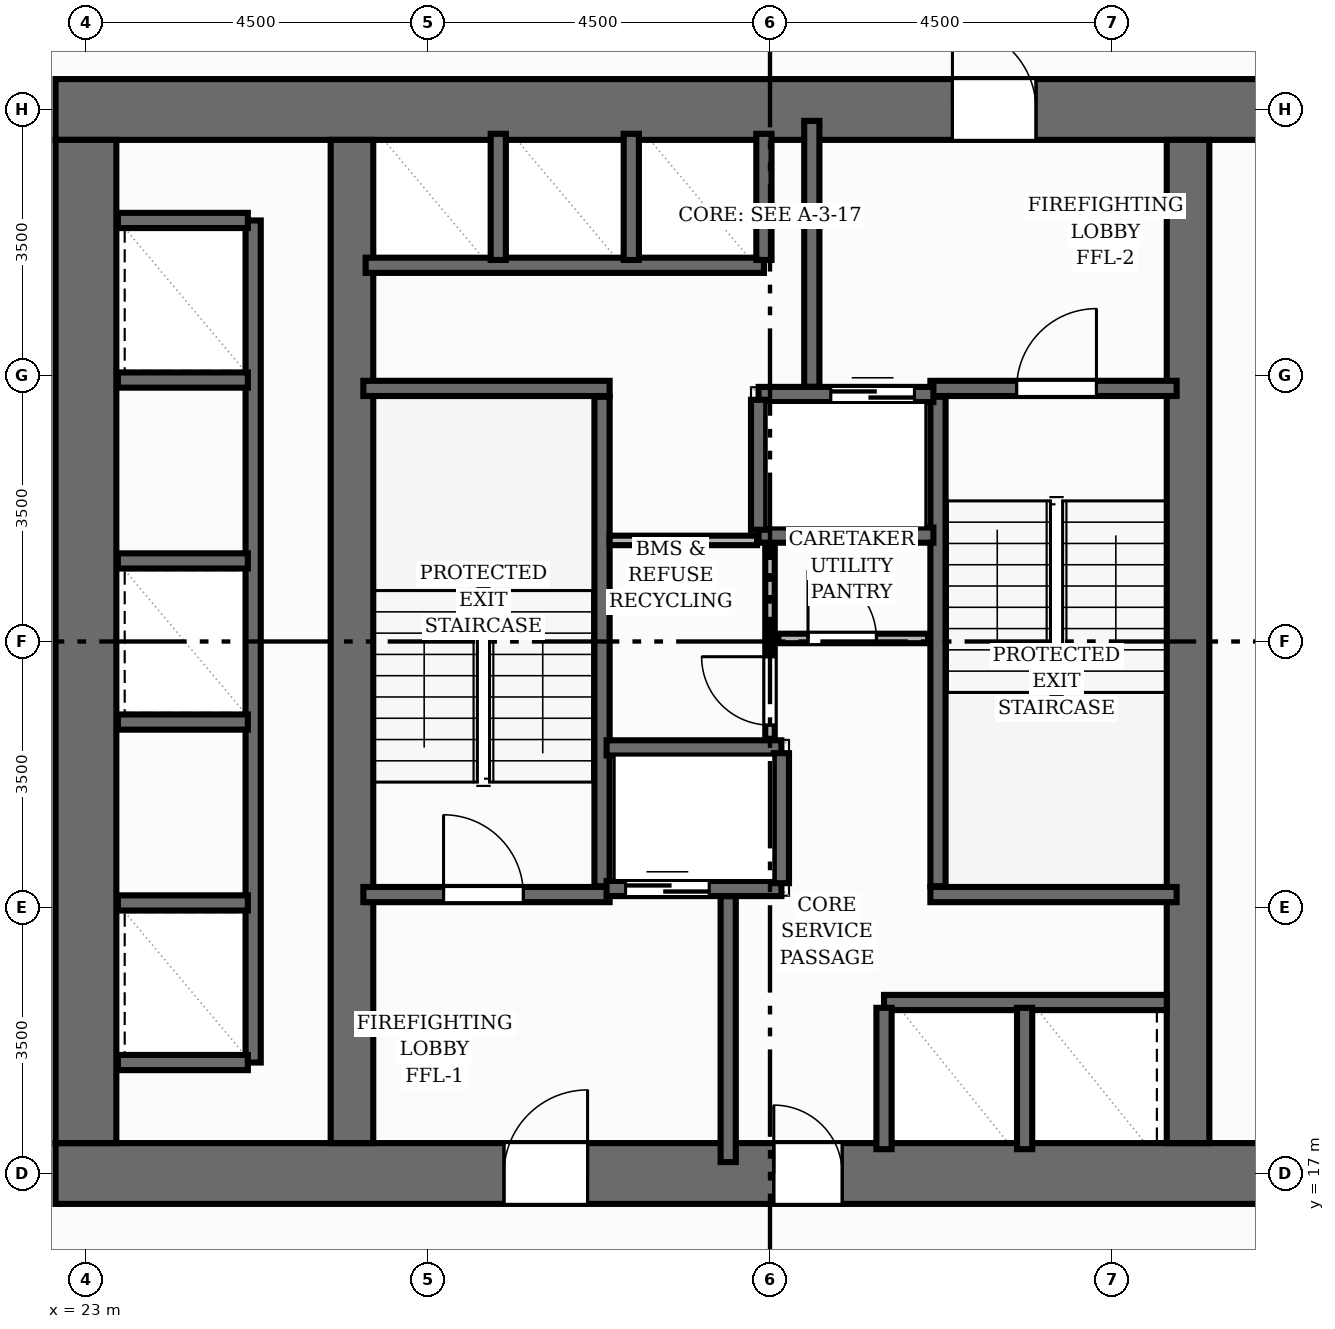
"""IFC4 building model, lengths in metres.
Left out: names, types, materials, properties, quantities, classifications, styles, units other than length and angle.
Written with IfcOpenShell. Run it as: python <this file> out.ifc"""

import sys

from ifc_helpers import new_model, si_unit, direction, frame, frame_2d, origin, place, context, subcontext, project, spatial, rectangle, extrude, element, fill, save


model = new_model("IFC4")
c1 = context("Model", 3, precision=1e-05, world=origin(), true_north=direction((0.0, 1.0)))
c2 = subcontext(c1, "Body", "Model", "MODEL_VIEW")
j1 = project(units=[si_unit("LENGTHUNIT", "METRE"), si_unit("PLANEANGLEUNIT", "RADIAN")], contexts=[c1])
p1 = place(None, origin())
s1 = spatial("IfcSite", under=j1, at=p1, CompositionType="ELEMENT")
p2 = place(p1, origin())
s2 = spatial("IfcBuilding", under=s1, at=p2, CompositionType="ELEMENT")
p3 = place(p2, frame((0.0, 0.0, 63.2)))
s3 = spatial("IfcBuildingStorey", under=s2, at=p3, CompositionType="ELEMENT", Elevation=63.2)
p4 = place(p3, frame((22.6, 17.0, 0.0), z_axis=(0.0, 0.0, 1.0), x_axis=(1.0, 0.0, 0.0)))
e1 = element("IfcWall", 1, at=p4, inside=s3, PredefinedType="SHEAR", context=c2, shape_type="SweptSolid", body=[
    extrude(rectangle(XDim=18.8, YDim=0.8, at=frame_2d((9.4, 0.0))), origin(), (0.0, 0.0, 1.0), 3.2),
])
p5 = place(p4, frame((5.9, 0.0, 0.0)))
e2 = element("IfcOpeningElement", 2, at=p5, cuts=e1, PredefinedType="OPENING", context=c2, shape_type="SweptSolid", body=[
    extrude(rectangle(XDim=1.1, YDim=2.15, at=frame_2d((0.55, 1.075))), frame((0.0, 0.41, 0.0), z_axis=(0.0, -1.0, 0.0), x_axis=(1.0, 0.0, 0.0)), (0.0, 0.0, 1.0), 0.82),
])
p6 = place(p4, frame((9.45, 0.0, 0.0)))
e3 = element("IfcOpeningElement", 3, at=p6, cuts=e1, PredefinedType="OPENING", context=c2, shape_type="SweptSolid", body=[
    extrude(rectangle(XDim=0.9, YDim=2.0, at=frame_2d((0.45, 1.0))), frame((0.0, 0.41, 0.0), z_axis=(0.0, -1.0, 0.0), x_axis=(1.0, 0.0, 0.0)), (0.0, 0.0, 1.0), 0.82),
])
p7 = place(p3, frame((22.6, 31.0, 0.0), z_axis=(0.0, 0.0, 1.0), x_axis=(1.0, 0.0, 0.0)))
e4 = element("IfcWall", 4, at=p7, inside=s3, PredefinedType="SHEAR", context=c2, shape_type="SweptSolid", body=[
    extrude(rectangle(XDim=18.8, YDim=0.8, at=frame_2d((9.4, 0.0))), origin(), (0.0, 0.0, 1.0), 3.2),
])
p8 = place(p7, frame((11.8, 0.0, 0.0)))
e5 = element("IfcOpeningElement", 5, at=p8, cuts=e4, PredefinedType="OPENING", context=c2, shape_type="SweptSolid", body=[
    extrude(rectangle(XDim=1.1, YDim=2.15, at=frame_2d((0.55, 1.075))), frame((0.0, 0.41, 0.0), z_axis=(0.0, -1.0, 0.0), x_axis=(1.0, 0.0, 0.0)), (0.0, 0.0, 1.0), 0.82),
])
p9 = place(p3, frame((23.0, 17.4, 0.0), z_axis=(0.0, 0.0, 1.0), x_axis=(0.0, 1.0, 0.0)))
e6 = element("IfcWall", 6, at=p9, inside=s3, PredefinedType="SHEAR", context=c2, shape_type="SweptSolid", body=[
    extrude(rectangle(XDim=13.2, YDim=0.8, at=frame_2d((6.6, 0.0))), origin(), (0.0, 0.0, 1.0), 3.2),
])
for number, where, z_axis, x_axis in (
    (7, (26.5, 17.4, 0.0), (0.0, 0.0, 1.0), (0.0, 1.0, 0.0)),
    (8, (37.5, 17.4, 0.0), (0.0, 0.0, 1.0), (0.0, 1.0, 0.0)),
):
    element("IfcWall", number, at=place(p3, frame(where, z_axis=z_axis, x_axis=x_axis)), inside=s3, PredefinedType="SHEAR", context=c2, shape_type="SweptSolid", body=[
        extrude(rectangle(XDim=13.2, YDim=0.56, at=frame_2d((6.6, 0.0))), origin(), (0.0, 0.0, 1.0), 3.2),
    ])
p10 = place(p3, frame((29.79, 20.78, 0.0), z_axis=(0.0, 0.0, 1.0), x_axis=(0.0, 1.0, 0.0)))
e9 = element("IfcWall", 9, at=p10, inside=s3, PredefinedType="SHEAR", context=c2, shape_type="SweptSolid", body=[
    extrude(rectangle(XDim=6.44, YDim=0.2, at=frame_2d((3.22, 0.0))), origin(), (0.0, 0.0, 1.0), 3.2),
])
p11 = place(p3, frame((26.65, 27.33, 0.0), z_axis=(0.0, 0.0, 1.0), x_axis=(1.0, 0.0, 0.0)))
e10 = element("IfcWall", 10, at=p11, inside=s3, PredefinedType="SHEAR", context=c2, shape_type="SweptSolid", body=[
    extrude(rectangle(XDim=3.24, YDim=0.2, at=frame_2d((1.62, 0.0))), origin(), (0.0, 0.0, 1.0), 3.2),
])
p12 = place(p3, frame((26.65, 20.67, 0.0), z_axis=(0.0, 0.0, 1.0), x_axis=(1.0, 0.0, 0.0)))
e11 = element("IfcWall", 11, at=p12, inside=s3, PredefinedType="SHEAR", context=c2, shape_type="SweptSolid", body=[
    extrude(rectangle(XDim=3.24, YDim=0.2, at=frame_2d((1.62, 0.0))), origin(), (0.0, 0.0, 1.0), 3.2),
])
p13 = place(p12, frame((1.055, 0.0, 0.0)))
e12 = element("IfcOpeningElement", 12, at=p13, cuts=e11, PredefinedType="OPENING", context=c2, shape_type="SweptSolid", body=[
    extrude(rectangle(XDim=1.05, YDim=2.15, at=frame_2d((0.525, 1.075))), frame((0.0, 0.11, 0.0), z_axis=(0.0, -1.0, 0.0), x_axis=(1.0, 0.0, 0.0)), (0.0, 0.0, 1.0), 0.22),
])
p14 = place(p3, frame((34.21, 20.78, 0.0), z_axis=(0.0, 0.0, 1.0), x_axis=(0.0, 1.0, 0.0)))
e13 = element("IfcWall", 13, at=p14, inside=s3, PredefinedType="SHEAR", context=c2, shape_type="SweptSolid", body=[
    extrude(rectangle(XDim=6.44, YDim=0.2, at=frame_2d((3.22, 0.0))), origin(), (0.0, 0.0, 1.0), 3.2),
])
p15 = place(p3, frame((34.11, 20.67, 0.0), z_axis=(0.0, 0.0, 1.0), x_axis=(1.0, 0.0, 0.0)))
e14 = element("IfcWall", 14, at=p15, inside=s3, PredefinedType="SHEAR", context=c2, shape_type="SweptSolid", body=[
    extrude(rectangle(XDim=3.24, YDim=0.2, at=frame_2d((1.62, 0.0))), origin(), (0.0, 0.0, 1.0), 3.2),
])
p16 = place(p3, frame((34.11, 27.33, 0.0), z_axis=(0.0, 0.0, 1.0), x_axis=(1.0, 0.0, 0.0)))
e15 = element("IfcWall", 15, at=p16, inside=s3, PredefinedType="SHEAR", context=c2, shape_type="SweptSolid", body=[
    extrude(rectangle(XDim=3.24, YDim=0.2, at=frame_2d((1.62, 0.0))), origin(), (0.0, 0.0, 1.0), 3.2),
])
p17 = place(p16, frame((1.135, 0.0, 0.0)))
e16 = element("IfcOpeningElement", 16, at=p17, cuts=e15, PredefinedType="OPENING", context=c2, shape_type="SweptSolid", body=[
    extrude(rectangle(XDim=1.05, YDim=2.15, at=frame_2d((0.525, 1.075))), frame((0.0, 0.11, 0.0), z_axis=(0.0, -1.0, 0.0), x_axis=(1.0, 0.0, 0.0)), (0.0, 0.0, 1.0), 0.22),
])
for number, where, z_axis, x_axis in (
    (17, (31.45, 17.15, 0.0), (0.0, 0.0, 1.0), (0.0, 1.0, 0.0)),
    (18, (32.55, 27.35, 0.0), (0.0, 0.0, 1.0), (0.0, 1.0, 0.0)),
):
    element("IfcWall", number, at=place(p3, frame(where, z_axis=z_axis, x_axis=x_axis)), inside=s3, PredefinedType="SHEAR", context=c2, shape_type="SweptSolid", body=[
        extrude(rectangle(XDim=3.5, YDim=0.2, at=frame_2d((1.75, 0.0))), origin(), (0.0, 0.0, 1.0), 3.2),
    ])
p18 = place(p3, frame((29.85, 20.75, 0.0), z_axis=(0.0, 0.0, 1.0), x_axis=(1.0, 0.0, 0.0)))
e19 = element("IfcWall", 19, at=p18, inside=s3, PredefinedType="SHEAR", context=c2, shape_type="SweptSolid", body=[
    extrude(rectangle(XDim=2.3, YDim=0.2, at=frame_2d((1.15, 0.0))), origin(), (0.0, 0.0, 1.0), 3.2),
])
p19 = place(p18, frame((0.25, 0.0, 0.0)))
e20 = element("IfcOpeningElement", 20, at=p19, cuts=e19, PredefinedType="OPENING", context=c2, shape_type="SweptSolid", body=[
    extrude(rectangle(XDim=1.1, YDim=2.15, at=frame_2d((0.55, 1.075))), frame((0.0, 0.11, 0.0), z_axis=(0.0, -1.0, 0.0), x_axis=(1.0, 0.0, 0.0)), (0.0, 0.0, 1.0), 0.22),
])
p20 = place(p3, frame((29.85, 22.6, 0.0), z_axis=(0.0, 0.0, 1.0), x_axis=(1.0, 0.0, 0.0)))
e21 = element("IfcWall", 21, at=p20, inside=s3, PredefinedType="SHEAR", context=c2, shape_type="SweptSolid", body=[
    extrude(rectangle(XDim=2.3, YDim=0.2, at=frame_2d((1.15, 0.0))), origin(), (0.0, 0.0, 1.0), 3.2),
])
p21 = place(p3, frame((32.15, 20.82, 0.0), z_axis=(0.0, 0.0, 1.0), x_axis=(0.0, 1.0, 0.0)))
e22 = element("IfcWall", 22, at=p21, inside=s3, PredefinedType="SHEAR", context=c2, shape_type="SweptSolid", body=[
    extrude(rectangle(XDim=1.71, YDim=0.2, at=frame_2d((0.855, 0.0))), origin(), (0.0, 0.0, 1.0), 3.2),
])
p22 = place(p3, frame((31.85, 27.25, 0.0), z_axis=(0.0, 0.0, 1.0), x_axis=(1.0, 0.0, 0.0)))
e23 = element("IfcWall", 23, at=p22, inside=s3, PredefinedType="SHEAR", context=c2, shape_type="SweptSolid", body=[
    extrude(rectangle(XDim=2.3, YDim=0.2, at=frame_2d((1.15, 0.0))), origin(), (0.0, 0.0, 1.0), 3.2),
])
p23 = place(p22, frame((0.95, 0.0, 0.0)))
e24 = element("IfcOpeningElement", 24, at=p23, cuts=e23, PredefinedType="OPENING", context=c2, shape_type="SweptSolid", body=[
    extrude(rectangle(XDim=1.1, YDim=2.15, at=frame_2d((0.55, 1.075))), frame((0.0, 0.11, 0.0), z_axis=(0.0, -1.0, 0.0), x_axis=(1.0, 0.0, 0.0)), (0.0, 0.0, 1.0), 0.22),
])
p24 = place(p3, frame((31.85, 25.4, 0.0), z_axis=(0.0, 0.0, 1.0), x_axis=(1.0, 0.0, 0.0)))
e25 = element("IfcWall", 25, at=p24, inside=s3, PredefinedType="SHEAR", context=c2, shape_type="SweptSolid", body=[
    extrude(rectangle(XDim=2.3, YDim=0.2, at=frame_2d((1.15, 0.0))), origin(), (0.0, 0.0, 1.0), 3.2),
])
p25 = place(p3, frame((31.85, 25.47, 0.0), z_axis=(0.0, 0.0, 1.0), x_axis=(0.0, 1.0, 0.0)))
e26 = element("IfcWall", 26, at=p25, inside=s3, PredefinedType="SHEAR", context=c2, shape_type="SweptSolid", body=[
    extrude(rectangle(XDim=1.71, YDim=0.2, at=frame_2d((0.855, 0.0))), origin(), (0.0, 0.0, 1.0), 3.2),
])
p26 = place(p3, frame((25.2, 18.46, 0.0), z_axis=(0.0, 0.0, 1.0), x_axis=(0.0, 1.0, 0.0)))
e27 = element("IfcWall", 27, at=p26, inside=s3, PredefinedType="SHEAR", context=c2, shape_type="SweptSolid", body=[
    extrude(rectangle(XDim=11.08, YDim=0.2, at=frame_2d((5.54, 0.0))), origin(), (0.0, 0.0, 1.0), 3.2),
])
for number, where, z_axis, x_axis in (
    (28, (23.42, 18.46, 0.0), (0.0, 0.0, 1.0), (1.0, 0.0, 0.0)),
    (29, (23.42, 29.54, 0.0), (0.0, 0.0, 1.0), (1.0, 0.0, 0.0)),
    (30, (23.42, 20.56, 0.0), (0.0, 0.0, 1.0), (1.0, 0.0, 0.0)),
    (31, (23.42, 22.94, 0.0), (0.0, 0.0, 1.0), (1.0, 0.0, 0.0)),
    (32, (23.42, 25.06, 0.0), (0.0, 0.0, 1.0), (1.0, 0.0, 0.0)),
    (33, (23.42, 27.44, 0.0), (0.0, 0.0, 1.0), (1.0, 0.0, 0.0)),
):
    element("IfcWall", number, at=place(p3, frame(where, z_axis=z_axis, x_axis=x_axis)), inside=s3, PredefinedType="SHEAR", context=c2, shape_type="SweptSolid", body=[
        extrude(rectangle(XDim=1.71, YDim=0.2, at=frame_2d((0.855, 0.0))), origin(), (0.0, 0.0, 1.0), 3.2),
    ])
p27 = place(p3, frame((26.68, 28.95, 0.0), z_axis=(0.0, 0.0, 1.0), x_axis=(1.0, 0.0, 0.0)))
e34 = element("IfcWall", 34, at=p27, inside=s3, PredefinedType="SHEAR", context=c2, shape_type="SweptSolid", body=[
    extrude(rectangle(XDim=5.24, YDim=0.2, at=frame_2d((2.62, 0.0))), origin(), (0.0, 0.0, 1.0), 3.2),
])
for number, where, z_axis, x_axis in (
    (35, (31.92, 29.02, 0.0), (0.0, 0.0, 1.0), (0.0, 1.0, 0.0)),
    (36, (28.425, 29.02, 0.0), (0.0, 0.0, 1.0), (0.0, 1.0, 0.0)),
    (37, (30.175, 29.02, 0.0), (0.0, 0.0, 1.0), (0.0, 1.0, 0.0)),
):
    element("IfcWall", number, at=place(p3, frame(where, z_axis=z_axis, x_axis=x_axis)), inside=s3, PredefinedType="SHEAR", context=c2, shape_type="SweptSolid", body=[
        extrude(rectangle(XDim=1.66, YDim=0.2, at=frame_2d((0.83, 0.0))), origin(), (0.0, 0.0, 1.0), 3.2),
    ])
p28 = place(p3, frame((33.5, 19.25, 0.0), z_axis=(0.0, 0.0, 1.0), x_axis=(1.0, 0.0, 0.0)))
e38 = element("IfcWall", 38, at=p28, inside=s3, PredefinedType="SHEAR", context=c2, shape_type="SweptSolid", body=[
    extrude(rectangle(XDim=3.72, YDim=0.2, at=frame_2d((1.86, 0.0))), origin(), (0.0, 0.0, 1.0), 3.2),
])
for number, where, z_axis, x_axis in (
    (39, (33.5, 17.32, 0.0), (0.0, 0.0, 1.0), (0.0, 1.0, 0.0)),
    (40, (35.35, 17.32, 0.0), (0.0, 0.0, 1.0), (0.0, 1.0, 0.0)),
):
    element("IfcWall", number, at=place(p3, frame(where, z_axis=z_axis, x_axis=x_axis)), inside=s3, PredefinedType="SHEAR", context=c2, shape_type="SweptSolid", body=[
        extrude(rectangle(XDim=1.86, YDim=0.2, at=frame_2d((0.93, 0.0))), origin(), (0.0, 0.0, 1.0), 3.2),
    ])
p29 = place(p3, frame((32.0, 22.72, 0.0), z_axis=(0.0, 0.0, 1.0), x_axis=(0.0, 1.0, 0.0)))
e41 = element("IfcWall", 41, at=p29, inside=s3, PredefinedType="PARTITIONING", context=c2, shape_type="SweptSolid", body=[
    extrude(rectangle(XDim=2.52, YDim=0.125, at=frame_2d((1.26, 0.0))), origin(), (0.0, 0.0, 1.0), 2.795),
])
p30 = place(p29, frame((0.18, 0.0, 0.0)))
e42 = element("IfcOpeningElement", 42, at=p30, cuts=e41, PredefinedType="OPENING", context=c2, shape_type="SweptSolid", body=[
    extrude(rectangle(XDim=0.9, YDim=2.1, at=frame_2d((0.45, 1.05))), frame((0.0, 0.073, 0.0), z_axis=(0.0, -1.0, 0.0), x_axis=(1.0, 0.0, 0.0)), (0.0, 0.0, 1.0), 0.145),
])
p31 = place(p3, frame((32.11, 24.04, 0.0), z_axis=(0.0, 0.0, 1.0), x_axis=(1.0, 0.0, 0.0)))
e43 = element("IfcWall", 43, at=p31, inside=s3, PredefinedType="PARTITIONING", context=c2, shape_type="SweptSolid", body=[
    extrude(rectangle(XDim=1.97, YDim=0.125, at=frame_2d((0.985, 0.0))), origin(), (0.0, 0.0, 1.0), 2.795),
])
p32 = place(p31, frame((0.39, 0.0, 0.0)))
e44 = element("IfcOpeningElement", 44, at=p32, cuts=e43, PredefinedType="OPENING", context=c2, shape_type="SweptSolid", body=[
    extrude(rectangle(XDim=0.9, YDim=2.1, at=frame_2d((0.45, 1.05))), frame((0.0, 0.073, 0.0), z_axis=(0.0, -1.0, 0.0), x_axis=(1.0, 0.0, 0.0)), (0.0, 0.0, 1.0), 0.145),
])
p33 = place(p3, frame((29.89, 25.33, 0.0), z_axis=(0.0, 0.0, 1.0), x_axis=(1.0, 0.0, 0.0)))
e45 = element("IfcWall", 45, at=p33, inside=s3, PredefinedType="PARTITIONING", context=c2, shape_type="SweptSolid", body=[
    extrude(rectangle(XDim=1.94, YDim=0.125, at=frame_2d((0.97, 0.0))), origin(), (0.0, 0.0, 1.0), 2.795),
])
p34 = place(p13, origin())
e46 = element("IfcDoor", 46, at=p34, inside=s3, OperationType="SINGLE_SWING_LEFT", PredefinedType="DOOR", context=c2, shape_type="SweptSolid", body=[
    extrude(rectangle(XDim=1.05, YDim=2.15, at=frame_2d((0.525, 1.075))), frame((0.0, 0.025, 0.0), z_axis=(0.0, -1.0, 0.0), x_axis=(1.0, 0.0, 0.0)), (0.0, 0.0, 1.0), 0.05),
])
fill(e12, e46)
p35 = place(p17, origin())
e47 = element("IfcDoor", 47, at=p35, inside=s3, OperationType="SINGLE_SWING_RIGHT", PredefinedType="DOOR", context=c2, shape_type="SweptSolid", body=[
    extrude(rectangle(XDim=1.05, YDim=2.15, at=frame_2d((0.525, 1.075))), frame((0.0, 0.025, 0.0), z_axis=(0.0, -1.0, 0.0), x_axis=(1.0, 0.0, 0.0)), (0.0, 0.0, 1.0), 0.05),
])
fill(e16, e47)
p36 = place(p5, origin())
e48 = element("IfcDoor", 48, at=p36, inside=s3, OperationType="SINGLE_SWING_RIGHT", PredefinedType="DOOR", context=c2, shape_type="SweptSolid", body=[
    extrude(rectangle(XDim=1.1, YDim=2.15, at=frame_2d((0.55, 1.075))), frame((0.0, 0.025, 0.0), z_axis=(0.0, -1.0, 0.0), x_axis=(1.0, 0.0, 0.0)), (0.0, 0.0, 1.0), 0.05),
])
fill(e2, e48)
p37 = place(p8, origin())
e49 = element("IfcDoor", 49, at=p37, inside=s3, OperationType="SINGLE_SWING_LEFT", PredefinedType="DOOR", context=c2, shape_type="SweptSolid", body=[
    extrude(rectangle(XDim=1.1, YDim=2.15, at=frame_2d((0.55, 1.075))), frame((0.0, 0.025, 0.0), z_axis=(0.0, -1.0, 0.0), x_axis=(1.0, 0.0, 0.0)), (0.0, 0.0, 1.0), 0.05),
])
fill(e5, e49)
p38 = place(p19, origin())
e50 = element("IfcDoor", 50, at=p38, inside=s3, OperationType="DOUBLE_DOOR_SLIDING", PredefinedType="DOOR", context=c2, shape_type="SweptSolid", body=[
    extrude(rectangle(XDim=1.1, YDim=2.15, at=frame_2d((0.55, 1.075))), frame((0.0, 0.025, 0.0), z_axis=(0.0, -1.0, 0.0), x_axis=(1.0, 0.0, 0.0)), (0.0, 0.0, 1.0), 0.05),
])
fill(e20, e50)
p39 = place(p23, origin())
e51 = element("IfcDoor", 51, at=p39, inside=s3, OperationType="DOUBLE_DOOR_SLIDING", PredefinedType="DOOR", context=c2, shape_type="SweptSolid", body=[
    extrude(rectangle(XDim=1.1, YDim=2.15, at=frame_2d((0.55, 1.075))), frame((0.0, 0.025, 0.0), z_axis=(0.0, -1.0, 0.0), x_axis=(1.0, 0.0, 0.0)), (0.0, 0.0, 1.0), 0.05),
])
fill(e24, e51)
p40 = place(p6, origin())
e52 = element("IfcDoor", 52, at=p40, inside=s3, OperationType="SINGLE_SWING_LEFT", PredefinedType="DOOR", context=c2, shape_type="SweptSolid", body=[
    extrude(rectangle(XDim=0.9, YDim=2.0, at=frame_2d((0.45, 1.0))), frame((0.0, 0.025, 0.0), z_axis=(0.0, -1.0, 0.0), x_axis=(1.0, 0.0, 0.0)), (0.0, 0.0, 1.0), 0.05),
])
fill(e3, e52)
p41 = place(p32, origin())
e53 = element("IfcDoor", 53, at=p41, inside=s3, OperationType="SINGLE_SWING_LEFT", PredefinedType="DOOR", context=c2, shape_type="SweptSolid", body=[
    extrude(rectangle(XDim=0.9, YDim=2.1, at=frame_2d((0.45, 1.05))), frame((0.0, 0.025, 0.0), z_axis=(0.0, -1.0, 0.0), x_axis=(1.0, 0.0, 0.0)), (0.0, 0.0, 1.0), 0.05),
])
fill(e44, e53)
p42 = place(p30, origin())
e54 = element("IfcDoor", 54, at=p42, inside=s3, OperationType="SINGLE_SWING_RIGHT", PredefinedType="DOOR", context=c2, shape_type="SweptSolid", body=[
    extrude(rectangle(XDim=0.9, YDim=2.1, at=frame_2d((0.45, 1.05))), frame((0.0, 0.025, 0.0), z_axis=(0.0, -1.0, 0.0), x_axis=(1.0, 0.0, 0.0)), (0.0, 0.0, 1.0), 0.05),
])
fill(e42, e54)
save(model, sys.argv[1])
